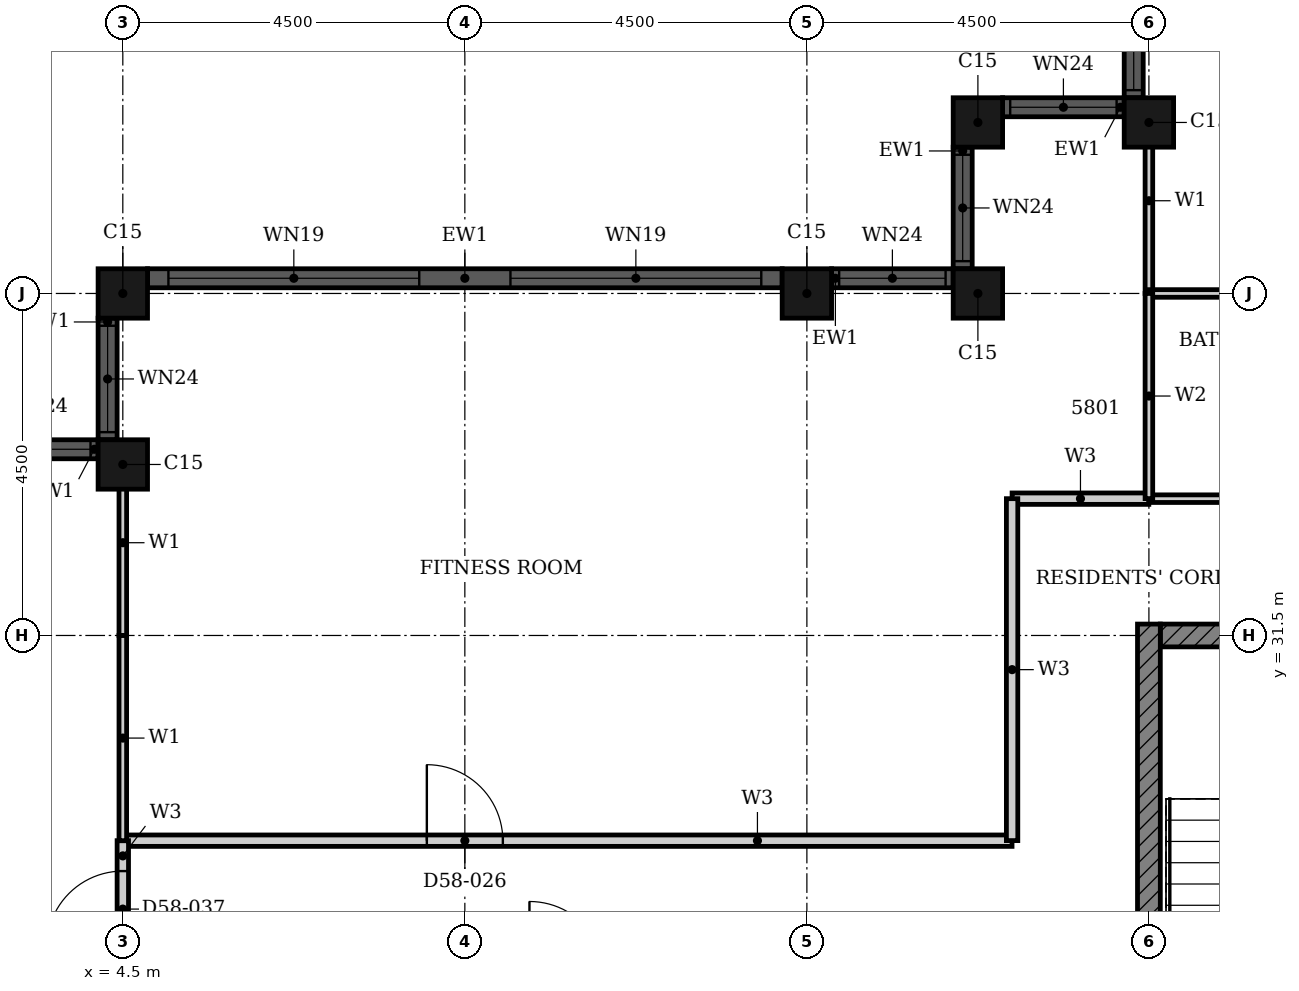
"""IFC4 building model, lengths in metres.
Left out: names, types, materials, properties, quantities, classifications, styles, units other than length and angle.
Written with IfcOpenShell. Run it as: python <this file> out.ifc"""

import sys

from ifc_helpers import new_model, si_unit, direction, frame, frame_2d, origin, origin_2d, place, context, subcontext, project, spatial, rectangle, hollow_rectangle, extrude, element, fill, save


model = new_model("IFC4")
c1 = context("Model", 3, precision=1e-05, world=origin(), true_north=direction((0.0, 1.0)))
c2 = subcontext(c1, "Body", "Model", "MODEL_VIEW")
j1 = project(units=[si_unit("LENGTHUNIT", "METRE"), si_unit("PLANEANGLEUNIT", "RADIAN")], contexts=[c1])
p1 = place(None, origin())
s1 = spatial("IfcSite", under=j1, at=p1, CompositionType="ELEMENT")
p2 = place(p1, origin())
s2 = spatial("IfcBuilding", under=s1, at=p2, CompositionType="ELEMENT")
p3 = place(p2, frame((0.0, 0.0, 229.4)))
s3 = spatial("IfcBuildingStorey", under=s2, at=p3, CompositionType="ELEMENT", Elevation=229.4)
for number, where, z_axis, x_axis in (
    (1, (18.0, 38.25, 0.0), (0.0, 0.0, 1.0), (1.0, 0.0, 0.0)),
    (2, (15.75, 38.25, 0.0), (0.0, 0.0, 1.0), (1.0, 0.0, 0.0)),
    (3, (15.75, 36.0, 0.0), (0.0, 0.0, 1.0), (1.0, 0.0, 0.0)),
    (4, (13.5, 36.0, 0.0), (0.0, 0.0, 1.0), (1.0, 0.0, 0.0)),
    (5, (4.5, 36.0, 0.0), (0.0, 0.0, 1.0), (1.0, 0.0, 0.0)),
    (6, (4.5, 33.75, 0.0), (0.0, 0.0, 1.0), (1.0, 0.0, 0.0)),
):
    element("IfcColumn", number, at=place(p3, frame(where, z_axis=z_axis, x_axis=x_axis)), inside=s3, PredefinedType="COLUMN", context=c2, shape_type="SweptSolid", body=[
        extrude(hollow_rectangle(XDim=0.65, YDim=0.65, WallThickness=0.021, at=origin_2d()), origin(), (0.0, 0.0, 1.0), 3.7),
    ])
p4 = place(p3, frame((17.8, 40.175, 0.0), z_axis=(0.0, 0.0, 1.0), x_axis=(0.0, -1.0, 0.0)))
e7 = element("IfcWall", 7, at=p4, inside=s3, PredefinedType="SOLIDWALL", context=c2, shape_type="SweptSolid", body=[
    extrude(rectangle(XDim=1.6, YDim=0.25, at=frame_2d((0.8, 0.0))), origin(), (0.0, 0.0, 1.0), 3.7),
])
p5 = place(p4, frame((0.1, 0.0, 0.9)))
e8 = element("IfcOpeningElement", 8, at=p5, cuts=e7, PredefinedType="OPENING", context=c2, shape_type="SweptSolid", body=[
    extrude(rectangle(XDim=1.4, YDim=1.75, at=frame_2d((0.7, 0.875))), frame((0.0, 0.135, 0.0), z_axis=(0.0, -1.0, 0.0), x_axis=(1.0, 0.0, 0.0)), (0.0, 0.0, 1.0), 0.27),
])
p6 = place(p3, frame((17.675, 38.45, 0.0), z_axis=(0.0, 0.0, 1.0), x_axis=(-1.0, 0.0, 0.0)))
e9 = element("IfcWall", 9, at=p6, inside=s3, PredefinedType="SOLIDWALL", context=c2, shape_type="SweptSolid", body=[
    extrude(rectangle(XDim=1.6, YDim=0.25, at=frame_2d((0.8, 0.0))), origin(), (0.0, 0.0, 1.0), 3.7),
])
p7 = place(p6, frame((0.1, 0.0, 0.9)))
e10 = element("IfcOpeningElement", 10, at=p7, cuts=e9, PredefinedType="OPENING", context=c2, shape_type="SweptSolid", body=[
    extrude(rectangle(XDim=1.4, YDim=1.75, at=frame_2d((0.7, 0.875))), frame((0.0, 0.135, 0.0), z_axis=(0.0, -1.0, 0.0), x_axis=(1.0, 0.0, 0.0)), (0.0, 0.0, 1.0), 0.27),
])
p8 = place(p3, frame((15.55, 37.925, 0.0), z_axis=(0.0, 0.0, 1.0), x_axis=(0.0, -1.0, 0.0)))
e11 = element("IfcWall", 11, at=p8, inside=s3, PredefinedType="SOLIDWALL", context=c2, shape_type="SweptSolid", body=[
    extrude(rectangle(XDim=1.6, YDim=0.25, at=frame_2d((0.8, 0.0))), origin(), (0.0, 0.0, 1.0), 3.7),
])
p9 = place(p8, frame((0.1, 0.0, 0.9)))
e12 = element("IfcOpeningElement", 12, at=p9, cuts=e11, PredefinedType="OPENING", context=c2, shape_type="SweptSolid", body=[
    extrude(rectangle(XDim=1.4, YDim=1.75, at=frame_2d((0.7, 0.875))), frame((0.0, 0.135, 0.0), z_axis=(0.0, -1.0, 0.0), x_axis=(1.0, 0.0, 0.0)), (0.0, 0.0, 1.0), 0.27),
])
p10 = place(p3, frame((15.425, 36.2, 0.0), z_axis=(0.0, 0.0, 1.0), x_axis=(-1.0, 0.0, 0.0)))
e13 = element("IfcWall", 13, at=p10, inside=s3, PredefinedType="SOLIDWALL", context=c2, shape_type="SweptSolid", body=[
    extrude(rectangle(XDim=1.6, YDim=0.25, at=frame_2d((0.8, 0.0))), origin(), (0.0, 0.0, 1.0), 3.7),
])
p11 = place(p10, frame((0.1, 0.0, 0.9)))
e14 = element("IfcOpeningElement", 14, at=p11, cuts=e13, PredefinedType="OPENING", context=c2, shape_type="SweptSolid", body=[
    extrude(rectangle(XDim=1.4, YDim=1.75, at=frame_2d((0.7, 0.875))), frame((0.0, 0.135, 0.0), z_axis=(0.0, -1.0, 0.0), x_axis=(1.0, 0.0, 0.0)), (0.0, 0.0, 1.0), 0.27),
])
p12 = place(p3, frame((13.175, 36.2, 0.0), z_axis=(0.0, 0.0, 1.0), x_axis=(-1.0, 0.0, 0.0)))
e15 = element("IfcWall", 15, at=p12, inside=s3, PredefinedType="SOLIDWALL", context=c2, shape_type="SweptSolid", body=[
    extrude(rectangle(XDim=8.35, YDim=0.25, at=frame_2d((4.175, 0.0))), origin(), (0.0, 0.0, 1.0), 3.7),
])
p13 = place(p12, frame((0.275, 0.0, 0.45)))
e16 = element("IfcOpeningElement", 16, at=p13, cuts=e15, PredefinedType="OPENING", context=c2, shape_type="SweptSolid", body=[
    extrude(rectangle(XDim=3.3, YDim=2.2, at=frame_2d((1.65, 1.1))), frame((0.0, 0.135, 0.0), z_axis=(0.0, -1.0, 0.0), x_axis=(1.0, 0.0, 0.0)), (0.0, 0.0, 1.0), 0.27),
])
p14 = place(p12, frame((4.775, 0.0, 0.45)))
e17 = element("IfcOpeningElement", 17, at=p14, cuts=e15, PredefinedType="OPENING", context=c2, shape_type="SweptSolid", body=[
    extrude(rectangle(XDim=3.3, YDim=2.2, at=frame_2d((1.65, 1.1))), frame((0.0, 0.135, 0.0), z_axis=(0.0, -1.0, 0.0), x_axis=(1.0, 0.0, 0.0)), (0.0, 0.0, 1.0), 0.27),
])
p15 = place(p3, frame((4.3, 35.675, 0.0), z_axis=(0.0, 0.0, 1.0), x_axis=(0.0, -1.0, 0.0)))
e18 = element("IfcWall", 18, at=p15, inside=s3, PredefinedType="SOLIDWALL", context=c2, shape_type="SweptSolid", body=[
    extrude(rectangle(XDim=1.6, YDim=0.25, at=frame_2d((0.8, 0.0))), origin(), (0.0, 0.0, 1.0), 3.7),
])
p16 = place(p15, frame((0.1, 0.0, 0.9)))
e19 = element("IfcOpeningElement", 19, at=p16, cuts=e18, PredefinedType="OPENING", context=c2, shape_type="SweptSolid", body=[
    extrude(rectangle(XDim=1.4, YDim=1.75, at=frame_2d((0.7, 0.875))), frame((0.0, 0.135, 0.0), z_axis=(0.0, -1.0, 0.0), x_axis=(1.0, 0.0, 0.0)), (0.0, 0.0, 1.0), 0.27),
])
p17 = place(p3, frame((4.175, 33.95, 0.0), z_axis=(0.0, 0.0, 1.0), x_axis=(-1.0, 0.0, 0.0)))
e20 = element("IfcWall", 20, at=p17, inside=s3, PredefinedType="SOLIDWALL", context=c2, shape_type="SweptSolid", body=[
    extrude(rectangle(XDim=1.6, YDim=0.25, at=frame_2d((0.8, 0.0))), origin(), (0.0, 0.0, 1.0), 3.7),
])
p18 = place(p17, frame((0.1, 0.0, 0.9)))
e21 = element("IfcOpeningElement", 21, at=p18, cuts=e20, PredefinedType="OPENING", context=c2, shape_type="SweptSolid", body=[
    extrude(rectangle(XDim=1.4, YDim=1.75, at=frame_2d((0.7, 0.875))), frame((0.0, 0.135, 0.0), z_axis=(0.0, -1.0, 0.0), x_axis=(1.0, 0.0, 0.0)), (0.0, 0.0, 1.0), 0.27),
])
p19 = place(p3, frame((18.15, 31.5, 0.0), z_axis=(0.0, 0.0, 1.0), x_axis=(1.0, 0.0, 0.0)))
e22 = element("IfcWall", 22, at=p19, inside=s3, PredefinedType="SHEAR", context=c2, shape_type="SweptSolid", body=[
    extrude(rectangle(XDim=9.368, YDim=0.3, at=frame_2d((4.684, 0.0))), origin(), (0.0, 0.0, 1.0), 3.3),
])
p20 = place(p19, frame((4.736, 0.0, 0.0)))
e23 = element("IfcOpeningElement", 23, at=p20, cuts=e22, PredefinedType="OPENING", context=c2, shape_type="SweptSolid", body=[
    extrude(rectangle(XDim=1.8, YDim=2.1, at=frame_2d((0.9, 1.05))), frame((0.0, 0.16, 0.0), z_axis=(0.0, -1.0, 0.0), x_axis=(1.0, 0.0, 0.0)), (0.0, 0.0, 1.0), 0.32),
])
p21 = place(p3, frame((18.0, 22.35, 0.0), z_axis=(0.0, 0.0, 1.0), x_axis=(0.0, 1.0, 0.0)))
e24 = element("IfcWall", 24, at=p21, inside=s3, PredefinedType="SHEAR", context=c2, shape_type="SweptSolid", body=[
    extrude(rectangle(XDim=9.3, YDim=0.3, at=frame_2d((4.65, 0.0))), origin(), (0.0, 0.0, 1.0), 3.3),
])
p22 = place(p3, frame((4.5, 28.8, 0.0), z_axis=(0.0, 0.0, 1.0), x_axis=(1.0, 0.0, 0.0)))
e25 = element("IfcWall", 25, at=p22, inside=s3, PredefinedType="PARTITIONING", context=c2, shape_type="SweptSolid", body=[
    extrude(rectangle(XDim=11.699, YDim=0.15, at=frame_2d((5.85, 0.0))), origin(), (0.0, 0.0, 1.0), 3.3),
])
p23 = place(p22, frame((4.0, 0.0, 0.0)))
e26 = element("IfcOpeningElement", 26, at=p23, cuts=e25, PredefinedType="OPENING", context=c2, shape_type="SweptSolid", body=[
    extrude(rectangle(XDim=1.0, YDim=2.1, at=frame_2d((0.5, 1.05))), frame((0.0, 0.085, 0.0), z_axis=(0.0, -1.0, 0.0), x_axis=(1.0, 0.0, 0.0)), (0.0, 0.0, 1.0), 0.17),
])
p24 = place(p3, frame((16.2, 33.3, 0.0), z_axis=(0.0, 0.0, 1.0), x_axis=(1.0, 0.0, 0.0)))
e27 = element("IfcWall", 27, at=p24, inside=s3, PredefinedType="PARTITIONING", context=c2, shape_type="SweptSolid", body=[
    extrude(rectangle(XDim=1.799, YDim=0.15, at=frame_2d((0.899, 0.0))), origin(), (0.0, 0.0, 1.0), 3.3),
])
p25 = place(p3, frame((16.2, 28.801, 0.0), z_axis=(0.0, 0.0, 1.0), x_axis=(0.0, 1.0, 0.0)))
e28 = element("IfcWall", 28, at=p25, inside=s3, PredefinedType="PARTITIONING", context=c2, shape_type="SweptSolid", body=[
    extrude(rectangle(XDim=4.499, YDim=0.15, at=frame_2d((2.25, 0.0))), origin(), (0.0, 0.0, 1.0), 3.3),
])
p26 = place(p3, frame((4.5, 27.0, 0.0), z_axis=(0.0, 0.0, 1.0), x_axis=(0.0, 1.0, 0.0)))
e29 = element("IfcWall", 29, at=p26, inside=s3, PredefinedType="PARTITIONING", context=c2, shape_type="SweptSolid", body=[
    extrude(rectangle(XDim=1.8, YDim=0.15, at=frame_2d((0.9, 0.0))), origin(), (0.0, 0.0, 1.0), 3.3),
])
p27 = place(p26, frame((0.4, 0.0, 0.0)))
e30 = element("IfcOpeningElement", 30, at=p27, cuts=e29, PredefinedType="OPENING", context=c2, shape_type="SweptSolid", body=[
    extrude(rectangle(XDim=1.0, YDim=2.1, at=frame_2d((0.5, 1.05))), frame((0.0, 0.085, 0.0), z_axis=(0.0, -1.0, 0.0), x_axis=(1.0, 0.0, 0.0)), (0.0, 0.0, 1.0), 0.17),
])
p28 = place(p3, frame((18.0, 36.0, 0.0), z_axis=(0.0, 0.0, 1.0), x_axis=(0.0, 1.0, 0.0)))
e31 = element("IfcWall", 31, at=p28, inside=s3, PredefinedType="PARTITIONING", context=c2, shape_type="SweptSolid", body=[
    extrude(rectangle(XDim=2.44, YDim=0.1, at=frame_2d((1.22, 0.0))), origin(), (0.0, 0.0, 1.0), 3.3),
])
p29 = place(p3, frame((4.5, 28.8, 0.0), z_axis=(0.0, 0.0, 1.0), x_axis=(0.0, 1.0, 0.0)))
e32 = element("IfcWall", 32, at=p29, inside=s3, PredefinedType="PARTITIONING", context=c2, shape_type="SweptSolid", body=[
    extrude(rectangle(XDim=2.7, YDim=0.1, at=frame_2d((1.35, 0.0))), origin(), (0.0, 0.0, 1.0), 3.3),
])
p30 = place(p3, frame((4.5, 31.501, 0.0), z_axis=(0.0, 0.0, 1.0), x_axis=(0.0, 1.0, 0.0)))
e33 = element("IfcWall", 33, at=p30, inside=s3, PredefinedType="PARTITIONING", context=c2, shape_type="SweptSolid", body=[
    extrude(rectangle(XDim=2.439, YDim=0.1, at=frame_2d((1.219, 0.0))), origin(), (0.0, 0.0, 1.0), 3.3),
])
for number, where, z_axis, x_axis in (
    (34, (18.0, 33.3, 0.0), (0.0, 0.0, 1.0), (1.0, 0.0, 0.0)),
    (35, (18.0, 36.0, 0.0), (0.0, 0.0, 1.0), (1.0, 0.0, 0.0)),
):
    element("IfcWall", number, at=place(p3, frame(where, z_axis=z_axis, x_axis=x_axis)), inside=s3, PredefinedType="PARTITIONING", context=c2, shape_type="SweptSolid", body=[
        extrude(rectangle(XDim=2.4, YDim=0.1, at=frame_2d((1.2, 0.0))), origin(), (0.0, 0.0, 1.0), 3.3),
    ])
p31 = place(p3, frame((18.0, 33.301, 0.0), z_axis=(0.0, 0.0, 1.0), x_axis=(0.0, 1.0, 0.0)))
e36 = element("IfcWall", 36, at=p31, inside=s3, PredefinedType="PARTITIONING", context=c2, shape_type="SweptSolid", body=[
    extrude(rectangle(XDim=2.699, YDim=0.1, at=frame_2d((1.35, 0.0))), origin(), (0.0, 0.0, 1.0), 3.3),
])
p32 = place(p5, origin())
e37 = element("IfcWindow", 37, at=p32, inside=s3, PartitioningType="SINGLE_PANEL", PredefinedType="WINDOW", context=c2, shape_type="SweptSolid", body=[
    extrude(rectangle(XDim=1.4, YDim=1.75, at=frame_2d((0.7, 0.875))), frame((0.0, 0.03, 0.0), z_axis=(0.0, -1.0, 0.0), x_axis=(1.0, 0.0, 0.0)), (0.0, 0.0, 1.0), 0.06),
])
fill(e8, e37)
p33 = place(p7, origin())
e38 = element("IfcWindow", 38, at=p33, inside=s3, PartitioningType="SINGLE_PANEL", PredefinedType="WINDOW", context=c2, shape_type="SweptSolid", body=[
    extrude(rectangle(XDim=1.4, YDim=1.75, at=frame_2d((0.7, 0.875))), frame((0.0, 0.03, 0.0), z_axis=(0.0, -1.0, 0.0), x_axis=(1.0, 0.0, 0.0)), (0.0, 0.0, 1.0), 0.06),
])
fill(e10, e38)
p34 = place(p9, origin())
e39 = element("IfcWindow", 39, at=p34, inside=s3, PartitioningType="SINGLE_PANEL", PredefinedType="WINDOW", context=c2, shape_type="SweptSolid", body=[
    extrude(rectangle(XDim=1.4, YDim=1.75, at=frame_2d((0.7, 0.875))), frame((0.0, 0.03, 0.0), z_axis=(0.0, -1.0, 0.0), x_axis=(1.0, 0.0, 0.0)), (0.0, 0.0, 1.0), 0.06),
])
fill(e12, e39)
p35 = place(p11, origin())
e40 = element("IfcWindow", 40, at=p35, inside=s3, PartitioningType="SINGLE_PANEL", PredefinedType="WINDOW", context=c2, shape_type="SweptSolid", body=[
    extrude(rectangle(XDim=1.4, YDim=1.75, at=frame_2d((0.7, 0.875))), frame((0.0, 0.03, 0.0), z_axis=(0.0, -1.0, 0.0), x_axis=(1.0, 0.0, 0.0)), (0.0, 0.0, 1.0), 0.06),
])
fill(e14, e40)
p36 = place(p13, origin())
e41 = element("IfcWindow", 41, at=p36, inside=s3, PartitioningType="SINGLE_PANEL", PredefinedType="WINDOW", context=c2, shape_type="SweptSolid", body=[
    extrude(rectangle(XDim=3.3, YDim=2.2, at=frame_2d((1.65, 1.1))), frame((0.0, 0.03, 0.0), z_axis=(0.0, -1.0, 0.0), x_axis=(1.0, 0.0, 0.0)), (0.0, 0.0, 1.0), 0.06),
])
fill(e16, e41)
p37 = place(p14, origin())
e42 = element("IfcWindow", 42, at=p37, inside=s3, PartitioningType="SINGLE_PANEL", PredefinedType="WINDOW", context=c2, shape_type="SweptSolid", body=[
    extrude(rectangle(XDim=3.3, YDim=2.2, at=frame_2d((1.65, 1.1))), frame((0.0, 0.03, 0.0), z_axis=(0.0, -1.0, 0.0), x_axis=(1.0, 0.0, 0.0)), (0.0, 0.0, 1.0), 0.06),
])
fill(e17, e42)
p38 = place(p16, origin())
e43 = element("IfcWindow", 43, at=p38, inside=s3, PartitioningType="SINGLE_PANEL", PredefinedType="WINDOW", context=c2, shape_type="SweptSolid", body=[
    extrude(rectangle(XDim=1.4, YDim=1.75, at=frame_2d((0.7, 0.875))), frame((0.0, 0.03, 0.0), z_axis=(0.0, -1.0, 0.0), x_axis=(1.0, 0.0, 0.0)), (0.0, 0.0, 1.0), 0.06),
])
fill(e19, e43)
p39 = place(p18, origin())
e44 = element("IfcWindow", 44, at=p39, inside=s3, PartitioningType="SINGLE_PANEL", PredefinedType="WINDOW", context=c2, shape_type="SweptSolid", body=[
    extrude(rectangle(XDim=1.4, YDim=1.75, at=frame_2d((0.7, 0.875))), frame((0.0, 0.03, 0.0), z_axis=(0.0, -1.0, 0.0), x_axis=(1.0, 0.0, 0.0)), (0.0, 0.0, 1.0), 0.06),
])
fill(e21, e44)
p40 = place(p23, origin())
e45 = element("IfcDoor", 45, at=p40, inside=s3, OperationType="SINGLE_SWING_RIGHT", PredefinedType="DOOR", context=c2, shape_type="SweptSolid", body=[
    extrude(rectangle(XDim=1.0, YDim=2.1, at=frame_2d((0.5, 1.05))), frame((0.0, 0.025, 0.0), z_axis=(0.0, -1.0, 0.0), x_axis=(1.0, 0.0, 0.0)), (0.0, 0.0, 1.0), 0.05),
])
fill(e26, e45)
p41 = place(p27, origin())
e46 = element("IfcDoor", 46, at=p41, inside=s3, OperationType="SINGLE_SWING_LEFT", PredefinedType="DOOR", context=c2, shape_type="SweptSolid", body=[
    extrude(rectangle(XDim=1.0, YDim=2.1, at=frame_2d((0.5, 1.05))), frame((0.0, 0.025, 0.0), z_axis=(0.0, -1.0, 0.0), x_axis=(1.0, 0.0, 0.0)), (0.0, 0.0, 1.0), 0.05),
])
fill(e30, e46)
save(model, sys.argv[1])
